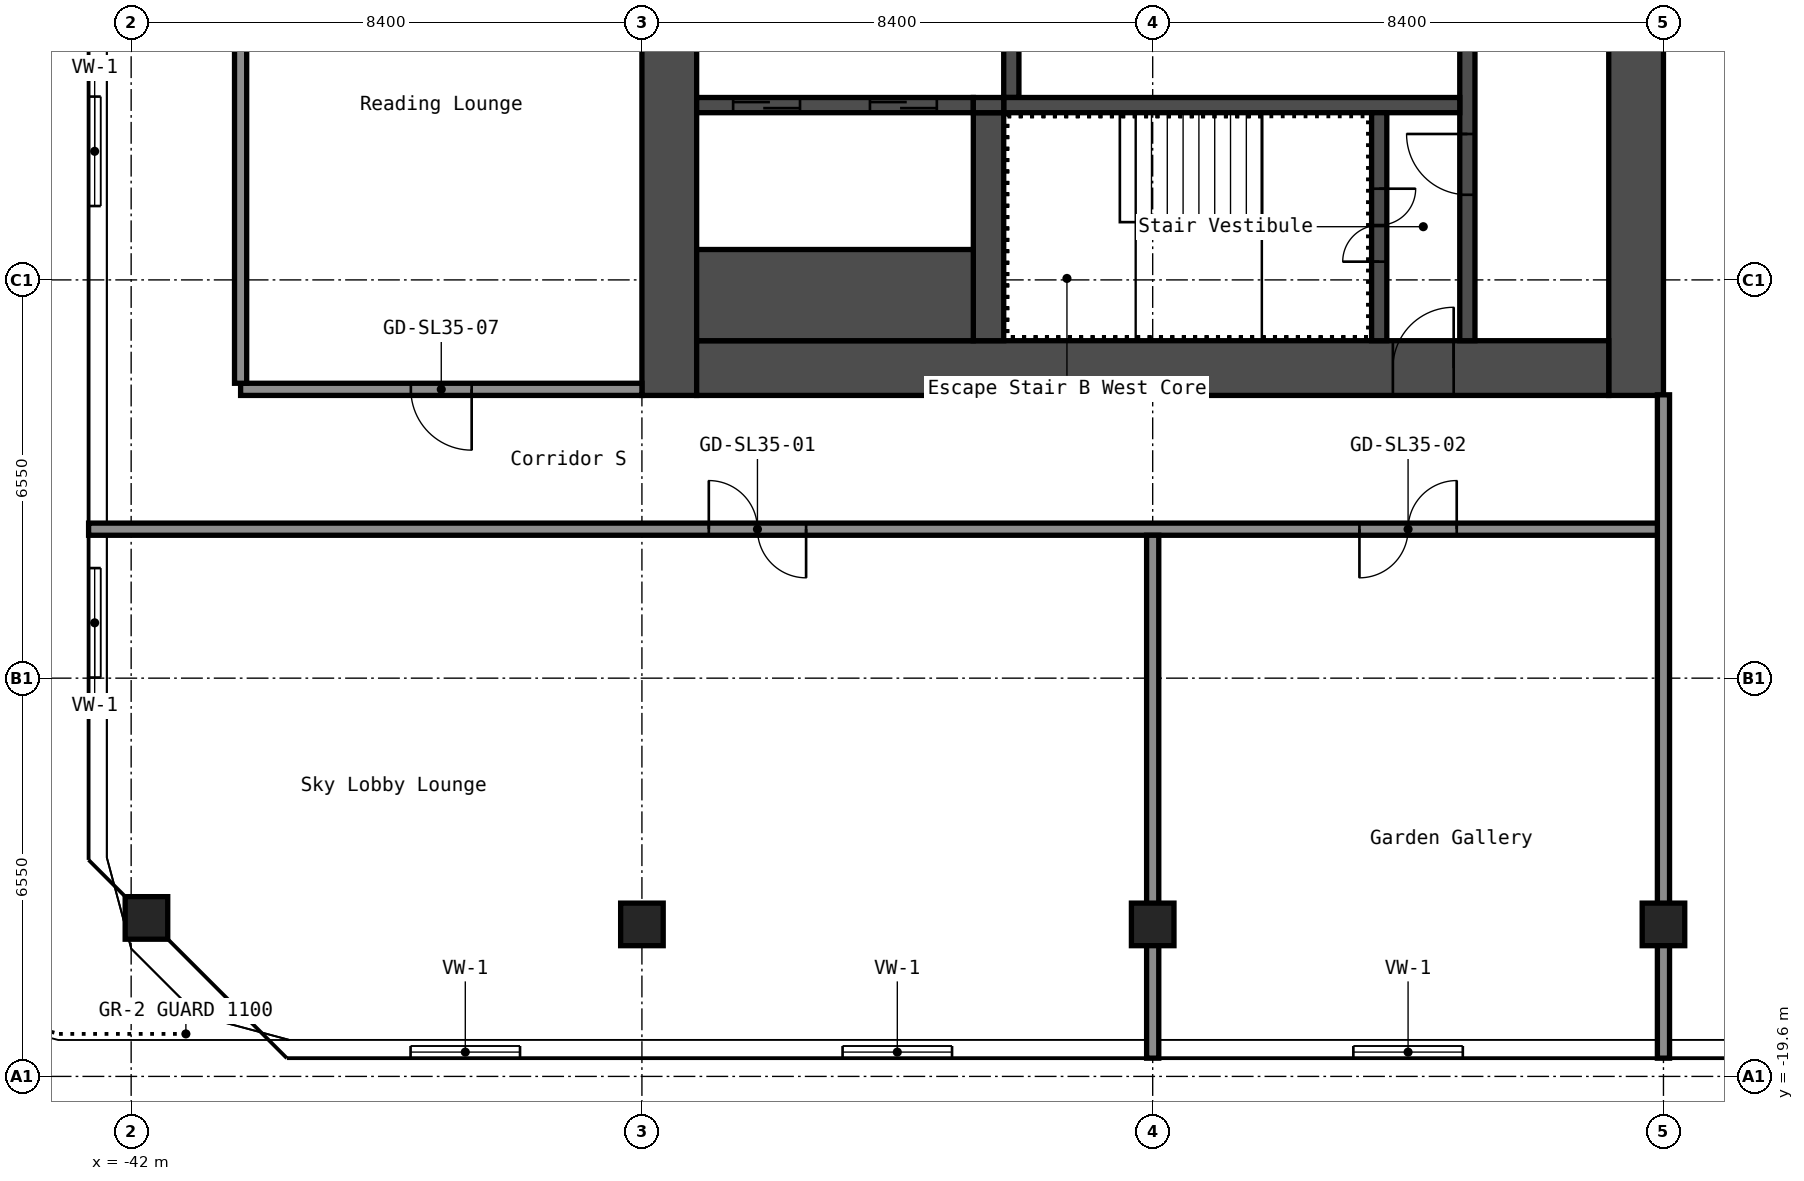
"""IFC4 building model, lengths in metres.
Left out: names, types, materials, properties, quantities, classifications, styles, units other than length and angle.
Written with IfcOpenShell. Run it as: python <this file> out.ifc"""

import sys

from ifc_helpers import new_model, si_unit, direction, frame, frame_2d, origin, origin_2d, place, context, subcontext, project, spatial, rectangle, hollow_rectangle, extrude, element, fill, save


model = new_model("IFC4")
c1 = context("Model", 3, precision=1e-05, world=origin(), true_north=direction((0.0, 1.0)))
c2 = subcontext(c1, "Body", "Model", "MODEL_VIEW")
j1 = project(units=[si_unit("LENGTHUNIT", "METRE"), si_unit("PLANEANGLEUNIT", "RADIAN")], contexts=[c1])
p1 = place(None, origin())
s1 = spatial("IfcSite", under=j1, at=p1, CompositionType="ELEMENT")
p2 = place(p1, origin())
s2 = spatial("IfcBuilding", under=s1, at=p2, CompositionType="ELEMENT")
p3 = place(p2, frame((0.0, 0.0, 124.6)))
s3 = spatial("IfcBuildingStorey", under=s2, at=p3, CompositionType="ELEMENT", Elevation=124.6)
for number, where, z_axis, x_axis in (
    (1, (-41.749, -16.994, 0.0), (0.0, 0.0, 1.0), (1.0, 0.0, 0.0)),
    (2, (-33.6, -17.1, 0.0), (0.0, 0.0, 1.0), (1.0, 0.0, 0.0)),
    (3, (-25.2, -17.1, 0.0), (0.0, 0.0, 1.0), (1.0, 0.0, 0.0)),
    (4, (-16.8, -17.1, 0.0), (0.0, 0.0, 1.0), (1.0, 0.0, 0.0)),
):
    element("IfcColumn", number, at=place(p3, frame(where, z_axis=z_axis, x_axis=x_axis)), inside=s3, PredefinedType="COLUMN", context=c2, shape_type="SweptSolid", body=[
        extrude(hollow_rectangle(XDim=0.7, YDim=0.7, WallThickness=0.028, at=origin_2d()), origin(), (0.0, 0.0, 1.0), 5.95),
    ])
p4 = place(p3, frame((-17.25, -8.4, 0.0), z_axis=(0.0, 0.0, 1.0), x_axis=(0.0, 1.0, 0.0)))
e5 = element("IfcWall", 5, at=p4, inside=s3, PredefinedType="SHEAR", context=c2, shape_type="SweptSolid", body=[
    extrude(rectangle(XDim=16.8, YDim=0.9, at=frame_2d((8.4, 0.0))), origin(), (0.0, 0.0, 1.0), 5.95),
])
p5 = place(p4, frame((7.1, 0.0, 0.0)))
e6 = element("IfcOpeningElement", 6, at=p5, cuts=e5, PredefinedType="OPENING", context=c2, shape_type="SweptSolid", body=[
    extrude(rectangle(XDim=1.6, YDim=2.1, at=frame_2d((0.8, 1.05))), frame((0.0, 0.46, 0.0), z_axis=(0.0, -1.0, 0.0), x_axis=(1.0, 0.0, 0.0)), (0.0, 0.0, 1.0), 0.92),
])
p6 = place(p3, frame((-33.15, -8.4, 0.0), z_axis=(0.0, 0.0, 1.0), x_axis=(0.0, 1.0, 0.0)))
e7 = element("IfcWall", 7, at=p6, inside=s3, PredefinedType="SHEAR", context=c2, shape_type="SweptSolid", body=[
    extrude(rectangle(XDim=16.8, YDim=0.9, at=frame_2d((8.4, 0.0))), origin(), (0.0, 0.0, 1.0), 5.95),
])
p7 = place(p3, frame((-32.7, -7.95, 0.0), z_axis=(0.0, 0.0, 1.0), x_axis=(1.0, 0.0, 0.0)))
e8 = element("IfcWall", 8, at=p7, inside=s3, PredefinedType="SHEAR", context=c2, shape_type="SweptSolid", body=[
    extrude(rectangle(XDim=15.0, YDim=0.9, at=frame_2d((7.5, 0.0))), origin(), (0.0, 0.0, 1.0), 5.95),
])
p8 = place(p7, frame((11.45, 0.0, 0.0)))
e9 = element("IfcOpeningElement", 9, at=p8, cuts=e8, PredefinedType="OPENING", context=c2, shape_type="SweptSolid", body=[
    extrude(rectangle(XDim=1.0, YDim=2.1, at=frame_2d((0.5, 1.05))), frame((0.0, 0.46, 0.0), z_axis=(0.0, -1.0, 0.0), x_axis=(1.0, 0.0, 0.0)), (0.0, 0.0, 1.0), 0.92),
])
p9 = place(p3, frame((-20.025, -7.5, 0.0), z_axis=(0.0, 0.0, 1.0), x_axis=(0.0, 1.0, 0.0)))
e10 = element("IfcWall", 10, at=p9, inside=s3, PredefinedType="SHEAR", context=c2, shape_type="SweptSolid", body=[
    extrude(rectangle(XDim=6.3, YDim=0.25, at=frame_2d((3.15, 0.0))), origin(), (0.0, 0.0, 1.0), 5.95),
])
p10 = place(p9, frame((2.4, 0.0, 0.0)))
e11 = element("IfcOpeningElement", 11, at=p10, cuts=e10, PredefinedType="OPENING", context=c2, shape_type="SweptSolid", body=[
    extrude(rectangle(XDim=1.0, YDim=2.1, at=frame_2d((0.5, 1.05))), frame((0.0, 0.135, 0.0), z_axis=(0.0, -1.0, 0.0), x_axis=(1.0, 0.0, 0.0)), (0.0, 0.0, 1.0), 0.27),
])
p11 = place(p3, frame((-27.525, -3.5, 0.0), z_axis=(0.0, 0.0, 1.0), x_axis=(0.0, 1.0, 0.0)))
e12 = element("IfcWall", 12, at=p11, inside=s3, PredefinedType="SHEAR", context=c2, shape_type="SweptSolid", body=[
    extrude(rectangle(XDim=2.05, YDim=0.25, at=frame_2d((1.025, 0.0))), origin(), (0.0, 0.0, 1.0), 5.95),
])
p12 = place(p3, frame((-27.65, -3.625, 0.0), z_axis=(0.0, 0.0, 1.0), x_axis=(1.0, 0.0, 0.0)))
e13 = element("IfcWall", 13, at=p12, inside=s3, PredefinedType="SHEAR", context=c2, shape_type="SweptSolid", body=[
    extrude(rectangle(XDim=7.5, YDim=0.25, at=frame_2d((3.75, 0.0))), origin(), (0.0, 0.0, 1.0), 5.95),
])
p13 = place(p3, frame((-21.475, -7.5, 0.0), z_axis=(0.0, 0.0, 1.0), x_axis=(0.0, 1.0, 0.0)))
e14 = element("IfcWall", 14, at=p13, inside=s3, PredefinedType="SHEAR", context=c2, shape_type="SweptSolid", body=[
    extrude(rectangle(XDim=3.75, YDim=0.25, at=frame_2d((1.875, 0.0))), origin(), (0.0, 0.0, 1.0), 5.95),
])
p14 = place(p13, frame((1.3, 0.0, 0.0)))
e15 = element("IfcOpeningElement", 15, at=p14, cuts=e14, PredefinedType="OPENING", context=c2, shape_type="SweptSolid", body=[
    extrude(rectangle(XDim=1.2, YDim=2.1, at=frame_2d((0.6, 1.05))), frame((0.0, 0.135, 0.0), z_axis=(0.0, -1.0, 0.0), x_axis=(1.0, 0.0, 0.0)), (0.0, 0.0, 1.0), 0.27),
])
p15 = place(p3, frame((-27.9, -7.5, 0.0), z_axis=(0.0, 0.0, 1.0), x_axis=(0.0, 1.0, 0.0)))
e16 = element("IfcWall", 16, at=p15, inside=s3, PredefinedType="SHEAR", context=c2, shape_type="SweptSolid", body=[
    extrude(rectangle(XDim=3.75, YDim=0.5, at=frame_2d((1.875, 0.0))), origin(), (0.0, 0.0, 1.0), 5.95),
])
p16 = place(p3, frame((-32.7, -3.625, 0.0), z_axis=(0.0, 0.0, 1.0), x_axis=(1.0, 0.0, 0.0)))
e17 = element("IfcWall", 17, at=p16, inside=s3, PredefinedType="SHEAR", context=c2, shape_type="SweptSolid", body=[
    extrude(rectangle(XDim=4.55, YDim=0.25, at=frame_2d((2.275, 0.0))), origin(), (0.0, 0.0, 1.0), 5.95),
])
p17 = place(p16, frame((2.85, 0.0, 0.0)))
e18 = element("IfcOpeningElement", 18, at=p17, cuts=e17, PredefinedType="OPENING", context=c2, shape_type="SweptSolid", body=[
    extrude(rectangle(XDim=1.1, YDim=2.1, at=frame_2d((0.55, 1.05))), frame((0.0, 0.135, 0.0), z_axis=(0.0, -1.0, 0.0), x_axis=(1.0, 0.0, 0.0)), (0.0, 0.0, 1.0), 0.27),
])
p18 = place(p16, frame((0.6, 0.0, 0.0)))
e19 = element("IfcOpeningElement", 19, at=p18, cuts=e17, PredefinedType="OPENING", context=c2, shape_type="SweptSolid", body=[
    extrude(rectangle(XDim=1.1, YDim=2.1, at=frame_2d((0.55, 1.05))), frame((0.0, 0.135, 0.0), z_axis=(0.0, -1.0, 0.0), x_axis=(1.0, 0.0, 0.0)), (0.0, 0.0, 1.0), 0.27),
])
p19 = place(p3, frame((-32.7, -6.75, 0.0), z_axis=(0.0, 0.0, 1.0), x_axis=(1.0, 0.0, 0.0)))
e20 = element("IfcWall", 20, at=p19, inside=s3, PredefinedType="SHEAR", context=c2, shape_type="SweptSolid", body=[
    extrude(rectangle(XDim=4.55, YDim=1.5, at=frame_2d((2.275, 0.0))), origin(), (0.0, 0.0, 1.0), 5.95),
])
p20 = place(p3, frame((-28.15, -3.625, 0.0), z_axis=(0.0, 0.0, 1.0), x_axis=(1.0, 0.0, 0.0)))
e21 = element("IfcWall", 21, at=p20, inside=s3, PredefinedType="SHEAR", context=c2, shape_type="SweptSolid", body=[
    extrude(rectangle(XDim=0.5, YDim=0.25, at=frame_2d((0.25, 0.0))), origin(), (0.0, 0.0, 1.0), 5.95),
])
p21 = place(p3, frame((-42.7, -10.6, 0.0), z_axis=(0.0, 0.0, 1.0), x_axis=(1.0, 0.0, 0.0)))
e22 = element("IfcWall", 22, at=p21, inside=s3, PredefinedType="PARTITIONING", context=c2, shape_type="SweptSolid", body=[
    extrude(rectangle(XDim=25.9, YDim=0.2, at=frame_2d((12.95, 0.0))), origin(), (0.0, 0.0, 1.0), 5.95),
])
p22 = place(p21, frame((10.2, 0.0, 0.0)))
e23 = element("IfcOpeningElement", 23, at=p22, cuts=e22, PredefinedType="OPENING", context=c2, shape_type="SweptSolid", body=[
    extrude(rectangle(XDim=1.6, YDim=2.1, at=frame_2d((0.8, 1.05))), frame((0.0, 0.11, 0.0), z_axis=(0.0, -1.0, 0.0), x_axis=(1.0, 0.0, 0.0)), (0.0, 0.0, 1.0), 0.22),
])
p23 = place(p21, frame((20.9, 0.0, 0.0)))
e24 = element("IfcOpeningElement", 24, at=p23, cuts=e22, PredefinedType="OPENING", context=c2, shape_type="SweptSolid", body=[
    extrude(rectangle(XDim=1.6, YDim=2.1, at=frame_2d((0.8, 1.05))), frame((0.0, 0.11, 0.0), z_axis=(0.0, -1.0, 0.0), x_axis=(1.0, 0.0, 0.0)), (0.0, 0.0, 1.0), 0.22),
])
p24 = place(p3, frame((-40.2, -8.3, 0.0), z_axis=(0.0, 0.0, 1.0), x_axis=(1.0, 0.0, 0.0)))
e25 = element("IfcWall", 25, at=p24, inside=s3, PredefinedType="PARTITIONING", context=c2, shape_type="SweptSolid", body=[
    extrude(rectangle(XDim=6.6, YDim=0.2, at=frame_2d((3.3, 0.0))), origin(), (0.0, 0.0, 1.0), 5.95),
])
p25 = place(p24, frame((2.8, 0.0, 0.0)))
e26 = element("IfcOpeningElement", 26, at=p25, cuts=e25, PredefinedType="OPENING", context=c2, shape_type="SweptSolid", body=[
    extrude(rectangle(XDim=1.0, YDim=2.1, at=frame_2d((0.5, 1.05))), frame((0.0, 0.11, 0.0), z_axis=(0.0, -1.0, 0.0), x_axis=(1.0, 0.0, 0.0)), (0.0, 0.0, 1.0), 0.22),
])
p26 = place(p3, frame((-40.2, -8.2, 0.0), z_axis=(0.0, 0.0, 1.0), x_axis=(0.0, 1.0, 0.0)))
e27 = element("IfcWall", 27, at=p26, inside=s3, PredefinedType="PARTITIONING", context=c2, shape_type="SweptSolid", body=[
    extrude(rectangle(XDim=16.4, YDim=0.2, at=frame_2d((8.2, 0.0))), origin(), (0.0, 0.0, 1.0), 5.95),
])
p27 = place(p3, frame((-25.2, -19.3, 0.0), z_axis=(0.0, 0.0, 1.0), x_axis=(0.0, 1.0, 0.0)))
e28 = element("IfcWall", 28, at=p27, inside=s3, PredefinedType="PARTITIONING", context=c2, shape_type="SweptSolid", body=[
    extrude(rectangle(XDim=8.6, YDim=0.2, at=frame_2d((4.3, 0.0))), origin(), (0.0, 0.0, 1.0), 5.95),
])
p28 = place(p3, frame((-16.8, -19.3, 0.0), z_axis=(0.0, 0.0, 1.0), x_axis=(0.0, 1.0, 0.0)))
e29 = element("IfcWall", 29, at=p28, inside=s3, PredefinedType="PARTITIONING", context=c2, shape_type="SweptSolid", body=[
    extrude(rectangle(XDim=10.91, YDim=0.2, at=frame_2d((5.455, 0.0))), origin(), (0.0, 0.0, 1.0), 5.95),
])
p29 = place(p3, frame((-42.6, -0.5, 4.45), z_axis=(0.0, 0.0, 1.0), x_axis=(0.0, -1.0, 0.0)))
p30 = place(p29, frame((2.985, 0.0, 0.25)))
p31 = place(p30, origin())
e30 = element("IfcWindow", 30, at=p31, inside=s3, PartitioningType="SINGLE_PANEL", PredefinedType="WINDOW", context=c2, shape_type="SweptSolid", body=[
    extrude(rectangle(XDim=1.8, YDim=0.9, at=frame_2d((0.9, 0.45))), frame((0.0, 0.03, 0.0), z_axis=(0.0, -1.0, 0.0), x_axis=(1.0, 0.0, 0.0)), (0.0, 0.0, 1.0), 0.06),
])
p32 = place(p3, frame((-42.6, -8.27, 4.45), z_axis=(0.0, 0.0, 1.0), x_axis=(0.0, -1.0, 0.0)))
p33 = place(p32, frame((2.97, 0.0, 0.25)))
p34 = place(p33, origin())
e31 = element("IfcWindow", 31, at=p34, inside=s3, PartitioningType="SINGLE_PANEL", PredefinedType="WINDOW", context=c2, shape_type="SweptSolid", body=[
    extrude(rectangle(XDim=1.8, YDim=0.9, at=frame_2d((0.9, 0.45))), frame((0.0, 0.03, 0.0), z_axis=(0.0, -1.0, 0.0), x_axis=(1.0, 0.0, 0.0)), (0.0, 0.0, 1.0), 0.06),
])
p35 = place(p3, frame((-39.409, -19.2, 4.45), z_axis=(0.0, 0.0, 1.0), x_axis=(1.0, 0.0, 0.0)))
p36 = place(p35, frame((2.005, 0.0, 0.25)))
p37 = place(p36, origin())
e32 = element("IfcWindow", 32, at=p37, inside=s3, PartitioningType="SINGLE_PANEL", PredefinedType="WINDOW", context=c2, shape_type="SweptSolid", body=[
    extrude(rectangle(XDim=1.8, YDim=0.9, at=frame_2d((0.9, 0.45))), frame((0.0, 0.03, 0.0), z_axis=(0.0, -1.0, 0.0), x_axis=(1.0, 0.0, 0.0)), (0.0, 0.0, 1.0), 0.06),
])
p38 = place(p3, frame((-33.6, -19.2, 4.45), z_axis=(0.0, 0.0, 1.0), x_axis=(1.0, 0.0, 0.0)))
p39 = place(p38, frame((3.3, 0.0, 0.25)))
p40 = place(p39, origin())
e33 = element("IfcWindow", 33, at=p40, inside=s3, PartitioningType="SINGLE_PANEL", PredefinedType="WINDOW", context=c2, shape_type="SweptSolid", body=[
    extrude(rectangle(XDim=1.8, YDim=0.9, at=frame_2d((0.9, 0.45))), frame((0.0, 0.03, 0.0), z_axis=(0.0, -1.0, 0.0), x_axis=(1.0, 0.0, 0.0)), (0.0, 0.0, 1.0), 0.06),
])
p41 = place(p3, frame((-25.2, -19.2, 4.45), z_axis=(0.0, 0.0, 1.0), x_axis=(1.0, 0.0, 0.0)))
p42 = place(p41, frame((3.3, 0.0, 0.25)))
p43 = place(p42, origin())
e34 = element("IfcWindow", 34, at=p43, inside=s3, PartitioningType="SINGLE_PANEL", PredefinedType="WINDOW", context=c2, shape_type="SweptSolid", body=[
    extrude(rectangle(XDim=1.8, YDim=0.9, at=frame_2d((0.9, 0.45))), frame((0.0, 0.03, 0.0), z_axis=(0.0, -1.0, 0.0), x_axis=(1.0, 0.0, 0.0)), (0.0, 0.0, 1.0), 0.06),
])
p44 = place(p8, origin())
e35 = element("IfcDoor", 35, at=p44, inside=s3, OperationType="SINGLE_SWING_LEFT", PredefinedType="DOOR", context=c2, shape_type="SweptSolid", body=[
    extrude(rectangle(XDim=1.0, YDim=2.1, at=frame_2d((0.5, 1.05))), frame((0.0, 0.025, 0.0), z_axis=(0.0, -1.0, 0.0), x_axis=(1.0, 0.0, 0.0)), (0.0, 0.0, 1.0), 0.05),
])
fill(e9, e35)
p45 = place(p14, origin())
e36 = element("IfcDoor", 36, at=p45, inside=s3, OperationType="DOUBLE_DOOR_SINGLE_SWING", PredefinedType="DOOR", context=c2, shape_type="SweptSolid", body=[
    extrude(rectangle(XDim=1.2, YDim=2.1, at=frame_2d((0.6, 1.05))), frame((0.0, 0.025, 0.0), z_axis=(0.0, -1.0, 0.0), x_axis=(1.0, 0.0, 0.0)), (0.0, 0.0, 1.0), 0.05),
])
fill(e15, e36)
p46 = place(p10, origin())
e37 = element("IfcDoor", 37, at=p46, inside=s3, OperationType="SINGLE_SWING_LEFT", PredefinedType="DOOR", context=c2, shape_type="SweptSolid", body=[
    extrude(rectangle(XDim=1.0, YDim=2.1, at=frame_2d((0.5, 1.05))), frame((0.0, 0.025, 0.0), z_axis=(0.0, -1.0, 0.0), x_axis=(1.0, 0.0, 0.0)), (0.0, 0.0, 1.0), 0.05),
])
fill(e11, e37)
p47 = place(p17, origin())
e38 = element("IfcDoor", 38, at=p47, inside=s3, OperationType="DOUBLE_DOOR_SLIDING", PredefinedType="DOOR", context=c2, shape_type="SweptSolid", body=[
    extrude(rectangle(XDim=1.1, YDim=2.1, at=frame_2d((0.55, 1.05))), frame((0.0, 0.025, 0.0), z_axis=(0.0, -1.0, 0.0), x_axis=(1.0, 0.0, 0.0)), (0.0, 0.0, 1.0), 0.05),
])
fill(e18, e38)
p48 = place(p18, origin())
e39 = element("IfcDoor", 39, at=p48, inside=s3, OperationType="DOUBLE_DOOR_SLIDING", PredefinedType="DOOR", context=c2, shape_type="SweptSolid", body=[
    extrude(rectangle(XDim=1.1, YDim=2.1, at=frame_2d((0.55, 1.05))), frame((0.0, 0.025, 0.0), z_axis=(0.0, -1.0, 0.0), x_axis=(1.0, 0.0, 0.0)), (0.0, 0.0, 1.0), 0.05),
])
fill(e19, e39)
p49 = place(p22, origin())
e40 = element("IfcDoor", 40, at=p49, inside=s3, OperationType="DOUBLE_DOOR_SINGLE_SWING", PredefinedType="DOOR", context=c2, shape_type="SweptSolid", body=[
    extrude(rectangle(XDim=1.6, YDim=2.1, at=frame_2d((0.8, 1.05))), frame((0.0, 0.025, 0.0), z_axis=(0.0, -1.0, 0.0), x_axis=(1.0, 0.0, 0.0)), (0.0, 0.0, 1.0), 0.05),
])
fill(e23, e40)
p50 = place(p23, origin())
e41 = element("IfcDoor", 41, at=p50, inside=s3, OperationType="DOUBLE_DOOR_SINGLE_SWING", PredefinedType="DOOR", context=c2, shape_type="SweptSolid", body=[
    extrude(rectangle(XDim=1.6, YDim=2.1, at=frame_2d((0.8, 1.05))), frame((0.0, 0.025, 0.0), z_axis=(0.0, -1.0, 0.0), x_axis=(1.0, 0.0, 0.0)), (0.0, 0.0, 1.0), 0.05),
])
fill(e24, e41)
p51 = place(p25, origin())
e42 = element("IfcDoor", 42, at=p51, inside=s3, OperationType="SINGLE_SWING_RIGHT", PredefinedType="DOOR", context=c2, shape_type="SweptSolid", body=[
    extrude(rectangle(XDim=1.0, YDim=2.1, at=frame_2d((0.5, 1.05))), frame((0.0, 0.025, 0.0), z_axis=(0.0, -1.0, 0.0), x_axis=(1.0, 0.0, 0.0)), (0.0, 0.0, 1.0), 0.05),
])
fill(e26, e42)
save(model, sys.argv[1])
